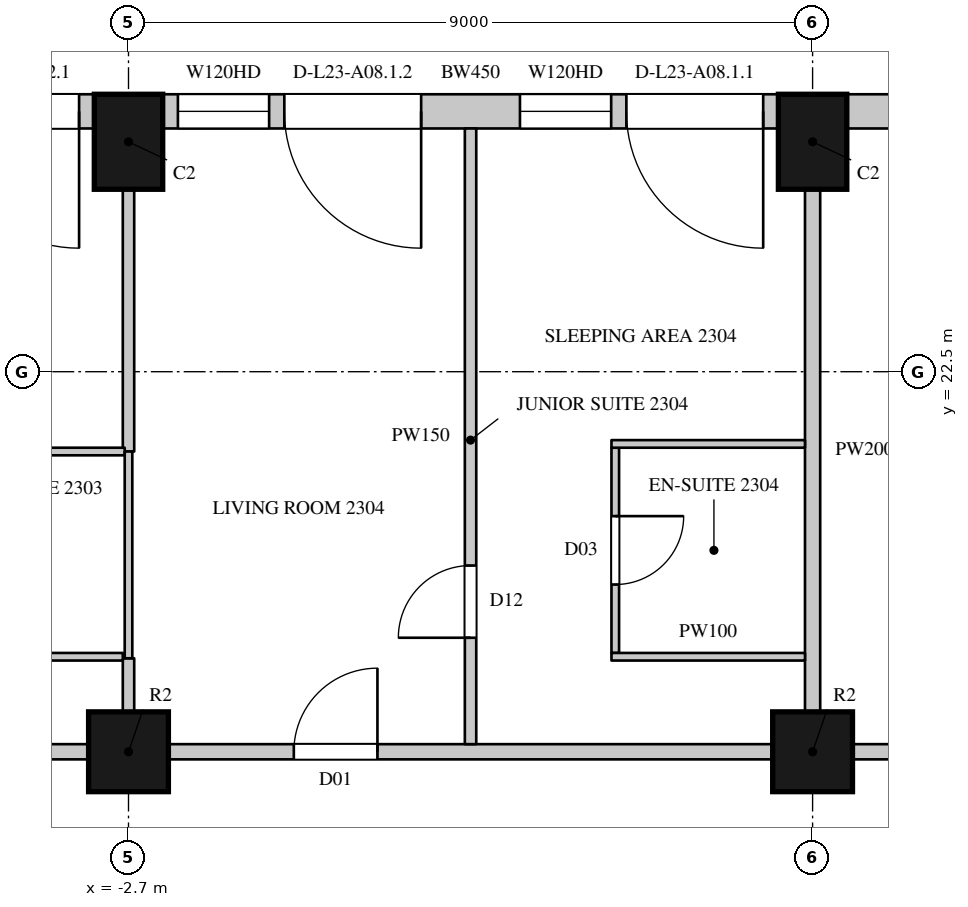
"""IFC4 building model, lengths in metres.
Left out: names, types, materials, properties, quantities, classifications, styles, units other than length and angle.
Written with IfcOpenShell. Run it as: python <this file> out.ifc"""

import sys

from ifc_helpers import new_model, si_unit, direction, frame, frame_2d, origin, origin_2d, place, context, subcontext, project, spatial, rectangle, circle, extrude, element, fill, save


model = new_model("IFC4")
c1 = context("Model", 3, precision=1e-05, world=origin(), true_north=direction((0.0, 1.0)))
c2 = subcontext(c1, "Body", "Model", "MODEL_VIEW")
j1 = project(units=[si_unit("LENGTHUNIT", "METRE"), si_unit("PLANEANGLEUNIT", "RADIAN")], contexts=[c1])
p1 = place(None, origin())
s1 = spatial("IfcSite", under=j1, at=p1, CompositionType="ELEMENT")
p2 = place(p1, origin())
s2 = spatial("IfcBuilding", under=s1, at=p2, CompositionType="ELEMENT")
p3 = place(p2, frame((0.0, 0.0, 113.1)))
s3 = spatial("IfcBuildingStorey", under=s2, at=p3, CompositionType="ELEMENT", Elevation=113.1)
for number, where, z_axis, x_axis in (
    (1, (6.3, 25.525, 0.0), (0.0, 0.0, 1.0), (-1.0, 0.0, 0.0)),
    (2, (-2.7, 25.525, 0.0), (0.0, 0.0, 1.0), (-1.0, 0.0, 0.0)),
):
    element("IfcColumn", number, at=place(p3, frame(where, z_axis=z_axis, x_axis=x_axis)), inside=s3, PredefinedType="COLUMN", context=c2, shape_type="SweptSolid", body=[
        extrude(rectangle(XDim=0.9, YDim=1.25, at=origin_2d()), origin(), (0.0, 0.0, 1.0), 3.6),
    ])
for number, where, z_axis, x_axis in (
    (3, (-2.7, 17.5, 0.0), (0.0, 0.0, 1.0), (1.0, 0.0, 0.0)),
    (4, (6.3, 17.5, 0.0), (0.0, 0.0, 1.0), (1.0, 0.0, 0.0)),
):
    element("IfcColumn", number, at=place(p3, frame(where, z_axis=z_axis, x_axis=x_axis)), inside=s3, PredefinedType="COLUMN", context=c2, shape_type="SweptSolid", body=[
        extrude(circle(Radius=0.525, at=origin_2d()), origin(), (0.0, 0.0, 1.0), 3.6),
    ])
p4 = place(p3, frame((11.989, 25.925, 0.0), z_axis=(0.0, 0.0, 1.0), x_axis=(-1.0, 0.0, 0.0)))
e5 = element("IfcWall", 5, at=p4, inside=s3, PredefinedType="SOLIDWALL", context=c2, shape_type="SweptSolid", body=[
    extrude(rectangle(XDim=5.239, YDim=0.45, at=frame_2d((2.619, 0.0))), origin(), (0.0, 0.0, 1.0), 3.3),
])
p5 = place(p4, frame((1.77, 0.0, 1.05)))
e6 = element("IfcOpeningElement", 6, at=p5, cuts=e5, PredefinedType="OPENING", context=c2, shape_type="SweptSolid", body=[
    extrude(rectangle(XDim=2.1, YDim=2.0, at=frame_2d((1.05, 1.0))), frame((0.0, 0.235, 0.0), z_axis=(0.0, -1.0, 0.0), x_axis=(1.0, 0.0, 0.0)), (0.0, 0.0, 1.0), 0.47),
])
p6 = place(p3, frame((5.85, 25.925, 0.0), z_axis=(0.0, 0.0, 1.0), x_axis=(-1.0, 0.0, 0.0)))
e7 = element("IfcWall", 7, at=p6, inside=s3, PredefinedType="SOLIDWALL", context=c2, shape_type="SweptSolid", body=[
    extrude(rectangle(XDim=8.1, YDim=0.45, at=frame_2d((4.05, 0.0))), origin(), (0.0, 0.0, 1.0), 3.3),
])
p7 = place(p6, frame((0.2, 0.0, 0.0)))
e8 = element("IfcOpeningElement", 8, at=p7, cuts=e7, PredefinedType="OPENING", context=c2, shape_type="SweptSolid", body=[
    extrude(rectangle(XDim=1.8, YDim=2.4, at=frame_2d((0.9, 1.2))), frame((0.0, 0.235, 0.0), z_axis=(0.0, -1.0, 0.0), x_axis=(1.0, 0.0, 0.0)), (0.0, 0.0, 1.0), 0.47),
])
p8 = place(p6, frame((2.2, 0.0, 1.05)))
e9 = element("IfcOpeningElement", 9, at=p8, cuts=e7, PredefinedType="OPENING", context=c2, shape_type="SweptSolid", body=[
    extrude(rectangle(XDim=1.2, YDim=2.0, at=frame_2d((0.6, 1.0))), frame((0.0, 0.235, 0.0), z_axis=(0.0, -1.0, 0.0), x_axis=(1.0, 0.0, 0.0)), (0.0, 0.0, 1.0), 0.47),
])
p9 = place(p6, frame((4.7, 0.0, 0.0)))
e10 = element("IfcOpeningElement", 10, at=p9, cuts=e7, PredefinedType="OPENING", context=c2, shape_type="SweptSolid", body=[
    extrude(rectangle(XDim=1.8, YDim=2.4, at=frame_2d((0.9, 1.2))), frame((0.0, 0.235, 0.0), z_axis=(0.0, -1.0, 0.0), x_axis=(1.0, 0.0, 0.0)), (0.0, 0.0, 1.0), 0.47),
])
p10 = place(p6, frame((6.7, 0.0, 1.05)))
e11 = element("IfcOpeningElement", 11, at=p10, cuts=e7, PredefinedType="OPENING", context=c2, shape_type="SweptSolid", body=[
    extrude(rectangle(XDim=1.2, YDim=2.0, at=frame_2d((0.6, 1.0))), frame((0.0, 0.235, 0.0), z_axis=(0.0, -1.0, 0.0), x_axis=(1.0, 0.0, 0.0)), (0.0, 0.0, 1.0), 0.47),
])
p11 = place(p3, frame((-3.15, 25.925, 0.0), z_axis=(0.0, 0.0, 1.0), x_axis=(-1.0, 0.0, 0.0)))
e12 = element("IfcWall", 12, at=p11, inside=s3, PredefinedType="SOLIDWALL", context=c2, shape_type="SweptSolid", body=[
    extrude(rectangle(XDim=8.1, YDim=0.45, at=frame_2d((4.05, 0.0))), origin(), (0.0, 0.0, 1.0), 3.3),
])
p12 = place(p11, frame((0.2, 0.0, 0.0)))
e13 = element("IfcOpeningElement", 13, at=p12, cuts=e12, PredefinedType="OPENING", context=c2, shape_type="SweptSolid", body=[
    extrude(rectangle(XDim=1.8, YDim=2.4, at=frame_2d((0.9, 1.2))), frame((0.0, 0.235, 0.0), z_axis=(0.0, -1.0, 0.0), x_axis=(1.0, 0.0, 0.0)), (0.0, 0.0, 1.0), 0.47),
])
p13 = place(p11, frame((2.2, 0.0, 1.05)))
e14 = element("IfcOpeningElement", 14, at=p13, cuts=e12, PredefinedType="OPENING", context=c2, shape_type="SweptSolid", body=[
    extrude(rectangle(XDim=1.2, YDim=2.0, at=frame_2d((0.6, 1.0))), frame((0.0, 0.235, 0.0), z_axis=(0.0, -1.0, 0.0), x_axis=(1.0, 0.0, 0.0)), (0.0, 0.0, 1.0), 0.47),
])
p14 = place(p11, frame((4.7, 0.0, 0.0)))
e15 = element("IfcOpeningElement", 15, at=p14, cuts=e12, PredefinedType="OPENING", context=c2, shape_type="SweptSolid", body=[
    extrude(rectangle(XDim=1.8, YDim=2.4, at=frame_2d((0.9, 1.2))), frame((0.0, 0.235, 0.0), z_axis=(0.0, -1.0, 0.0), x_axis=(1.0, 0.0, 0.0)), (0.0, 0.0, 1.0), 0.47),
])
p15 = place(p11, frame((6.7, 0.0, 1.05)))
e16 = element("IfcOpeningElement", 16, at=p15, cuts=e12, PredefinedType="OPENING", context=c2, shape_type="SweptSolid", body=[
    extrude(rectangle(XDim=1.2, YDim=2.0, at=frame_2d((0.6, 1.0))), frame((0.0, 0.235, 0.0), z_axis=(0.0, -1.0, 0.0), x_axis=(1.0, 0.0, 0.0)), (0.0, 0.0, 1.0), 0.47),
])
p16 = place(p3, frame((-11.175, 17.5, 0.0), z_axis=(0.0, 0.0, 1.0), x_axis=(1.0, 0.0, 0.0)))
e17 = element("IfcWall", 17, at=p16, inside=s3, PredefinedType="PARTITIONING", context=c2, shape_type="SweptSolid", body=[
    extrude(rectangle(XDim=7.95, YDim=0.2, at=frame_2d((3.975, 0.0))), origin(), (0.0, 0.0, 1.0), 2.75),
])
p17 = place(p16, frame((4.55, 0.0, 0.0)))
e18 = element("IfcOpeningElement", 18, at=p17, cuts=e17, PredefinedType="OPENING", context=c2, shape_type="SweptSolid", body=[
    extrude(rectangle(XDim=0.95, YDim=2.2, at=frame_2d((0.475, 1.1))), frame((0.0, 0.11, 0.0), z_axis=(0.0, -1.0, 0.0), x_axis=(1.0, 0.0, 0.0)), (0.0, 0.0, 1.0), 0.22),
])
p18 = place(p3, frame((-2.175, 17.5, 0.0), z_axis=(0.0, 0.0, 1.0), x_axis=(1.0, 0.0, 0.0)))
e19 = element("IfcWall", 19, at=p18, inside=s3, PredefinedType="PARTITIONING", context=c2, shape_type="SweptSolid", body=[
    extrude(rectangle(XDim=7.95, YDim=0.2, at=frame_2d((3.975, 0.0))), origin(), (0.0, 0.0, 1.0), 2.75),
])
p19 = place(p18, frame((1.65, 0.0, 0.0)))
e20 = element("IfcOpeningElement", 20, at=p19, cuts=e19, PredefinedType="OPENING", context=c2, shape_type="SweptSolid", body=[
    extrude(rectangle(XDim=1.1, YDim=2.4, at=frame_2d((0.55, 1.2))), frame((0.0, 0.11, 0.0), z_axis=(0.0, -1.0, 0.0), x_axis=(1.0, 0.0, 0.0)), (0.0, 0.0, 1.0), 0.22),
])
p20 = place(p3, frame((6.825, 17.5, 0.0), z_axis=(0.0, 0.0, 1.0), x_axis=(1.0, 0.0, 0.0)))
e21 = element("IfcWall", 21, at=p20, inside=s3, PredefinedType="PARTITIONING", context=c2, shape_type="SweptSolid", body=[
    extrude(rectangle(XDim=7.95, YDim=0.2, at=frame_2d((3.975, 0.0))), origin(), (0.0, 0.0, 1.0), 2.75),
])
p21 = place(p20, frame((1.55, 0.0, 0.0)))
e22 = element("IfcOpeningElement", 22, at=p21, cuts=e21, PredefinedType="OPENING", context=c2, shape_type="SweptSolid", body=[
    extrude(rectangle(XDim=1.1, YDim=2.4, at=frame_2d((0.55, 1.2))), frame((0.0, 0.11, 0.0), z_axis=(0.0, -1.0, 0.0), x_axis=(1.0, 0.0, 0.0)), (0.0, 0.0, 1.0), 0.22),
])
p22 = place(p3, frame((-2.7, 18.025, 0.0), z_axis=(0.0, 0.0, 1.0), x_axis=(0.0, 1.0, 0.0)))
e23 = element("IfcWall", 23, at=p22, inside=s3, PredefinedType="PARTITIONING", context=c2, shape_type="SweptSolid", body=[
    extrude(rectangle(XDim=0.705, YDim=0.15, at=frame_2d((0.353, 0.0))), origin(), (0.0, 0.0, 1.0), 2.75),
])
p23 = place(p3, frame((-2.7, 21.45, 0.0), z_axis=(0.0, 0.0, 1.0), x_axis=(0.0, 1.0, 0.0)))
e24 = element("IfcWall", 24, at=p23, inside=s3, PredefinedType="PARTITIONING", context=c2, shape_type="SweptSolid", body=[
    extrude(rectangle(XDim=3.45, YDim=0.15, at=frame_2d((1.725, 0.0))), origin(), (0.0, 0.0, 1.0), 2.75),
])
p24 = place(p3, frame((1.8, 17.6, 0.0), z_axis=(0.0, 0.0, 1.0), x_axis=(0.0, 1.0, 0.0)))
e25 = element("IfcWall", 25, at=p24, inside=s3, PredefinedType="PARTITIONING", context=c2, shape_type="SweptSolid", body=[
    extrude(rectangle(XDim=8.1, YDim=0.15, at=frame_2d((4.05, 0.0))), origin(), (0.0, 0.0, 1.0), 2.65),
])
p25 = place(p24, frame((1.4, 0.0, 0.0)))
e26 = element("IfcOpeningElement", 26, at=p25, cuts=e25, PredefinedType="OPENING", context=c2, shape_type="SweptSolid", body=[
    extrude(rectangle(XDim=0.95, YDim=2.2, at=frame_2d((0.475, 1.1))), frame((0.0, 0.085, 0.0), z_axis=(0.0, -1.0, 0.0), x_axis=(1.0, 0.0, 0.0)), (0.0, 0.0, 1.0), 0.17),
])
p26 = place(p3, frame((6.3, 18.025, 0.0), z_axis=(0.0, 0.0, 1.0), x_axis=(0.0, 1.0, 0.0)))
e27 = element("IfcWall", 27, at=p26, inside=s3, PredefinedType="PARTITIONING", context=c2, shape_type="SweptSolid", body=[
    extrude(rectangle(XDim=6.875, YDim=0.2, at=frame_2d((3.438, 0.0))), origin(), (0.0, 0.0, 1.0), 2.75),
])
p27 = place(p3, frame((-5.146, 18.75, 0.0), z_axis=(0.0, 0.0, 1.0), x_axis=(1.0, 0.0, 0.0)))
e28 = element("IfcWall", 28, at=p27, inside=s3, PredefinedType="PARTITIONING", context=c2, shape_type="SweptSolid", body=[
    extrude(rectangle(XDim=2.371, YDim=0.1, at=frame_2d((1.186, 0.0))), origin(), (0.0, 0.0, 1.0), 3.3),
])
p28 = place(p3, frame((-5.146, 21.45, 0.0), z_axis=(0.0, 0.0, 1.0), x_axis=(1.0, 0.0, 0.0)))
e29 = element("IfcWall", 29, at=p28, inside=s3, PredefinedType="PARTITIONING", context=c2, shape_type="SweptSolid", body=[
    extrude(rectangle(XDim=2.396, YDim=0.1, at=frame_2d((1.198, 0.0))), origin(), (0.0, 0.0, 1.0), 3.3),
])
p29 = place(p3, frame((-2.7, 18.73, 0.0), z_axis=(0.0, 0.0, 1.0), x_axis=(0.0, 1.0, 0.0)))
e30 = element("IfcWall", 30, at=p29, inside=s3, PredefinedType="PARTITIONING", context=c2, shape_type="SweptSolid", body=[
    extrude(rectangle(XDim=2.72, YDim=0.1, at=frame_2d((1.36, 0.0))), origin(), (0.0, 0.0, 1.0), 2.75),
])
p30 = place(p3, frame((3.704, 18.8, 0.0), z_axis=(0.0, 0.0, 1.0), x_axis=(0.0, 1.0, 0.0)))
e31 = element("IfcWall", 31, at=p30, inside=s3, PredefinedType="PARTITIONING", context=c2, shape_type="SweptSolid", body=[
    extrude(rectangle(XDim=2.7, YDim=0.1, at=frame_2d((1.35, 0.0))), origin(), (0.0, 0.0, 1.0), 3.3),
])
p31 = place(p30, frame((0.9, 0.0, 0.0)))
e32 = element("IfcOpeningElement", 32, at=p31, cuts=e31, PredefinedType="OPENING", context=c2, shape_type="SweptSolid", body=[
    extrude(rectangle(XDim=0.9, YDim=2.2, at=frame_2d((0.45, 1.1))), frame((0.0, 0.06, 0.0), z_axis=(0.0, -1.0, 0.0), x_axis=(1.0, 0.0, 0.0)), (0.0, 0.0, 1.0), 0.12),
])
for number, where, z_axis, x_axis in (
    (33, (3.654, 18.75, 0.0), (0.0, 0.0, 1.0), (1.0, 0.0, 0.0)),
    (34, (3.654, 21.55, 0.0), (0.0, 0.0, 1.0), (1.0, 0.0, 0.0)),
):
    element("IfcWall", number, at=place(p3, frame(where, z_axis=z_axis, x_axis=x_axis)), inside=s3, PredefinedType="PARTITIONING", context=c2, shape_type="SweptSolid", body=[
        extrude(rectangle(XDim=2.546, YDim=0.1, at=frame_2d((1.273, 0.0))), origin(), (0.0, 0.0, 1.0), 3.3),
    ])
p32 = place(p7, origin())
e35 = element("IfcDoor", 35, at=p32, inside=s3, OperationType="SLIDING_TO_LEFT", PredefinedType="DOOR", context=c2, shape_type="SweptSolid", body=[
    extrude(rectangle(XDim=1.8, YDim=2.4, at=frame_2d((0.9, 1.2))), frame((0.0, 0.13, 0.0), z_axis=(0.0, -1.0, 0.0), x_axis=(1.0, 0.0, 0.0)), (0.0, 0.0, 1.0), 0.05),
])
fill(e8, e35)
p33 = place(p8, origin())
e36 = element("IfcWindow", 36, at=p33, inside=s3, PartitioningType="SINGLE_PANEL", PredefinedType="WINDOW", context=c2, shape_type="SweptSolid", body=[
    extrude(rectangle(XDim=1.2, YDim=2.0, at=frame_2d((0.6, 1.0))), frame((0.0, 0.135, 0.0), z_axis=(0.0, -1.0, 0.0), x_axis=(1.0, 0.0, 0.0)), (0.0, 0.0, 1.0), 0.06),
])
fill(e9, e36)
p34 = place(p9, origin())
e37 = element("IfcDoor", 37, at=p34, inside=s3, OperationType="SLIDING_TO_LEFT", PredefinedType="DOOR", context=c2, shape_type="SweptSolid", body=[
    extrude(rectangle(XDim=1.8, YDim=2.4, at=frame_2d((0.9, 1.2))), frame((0.0, 0.13, 0.0), z_axis=(0.0, -1.0, 0.0), x_axis=(1.0, 0.0, 0.0)), (0.0, 0.0, 1.0), 0.05),
])
fill(e10, e37)
p35 = place(p10, origin())
e38 = element("IfcWindow", 38, at=p35, inside=s3, PartitioningType="SINGLE_PANEL", PredefinedType="WINDOW", context=c2, shape_type="SweptSolid", body=[
    extrude(rectangle(XDim=1.2, YDim=2.0, at=frame_2d((0.6, 1.0))), frame((0.0, 0.135, 0.0), z_axis=(0.0, -1.0, 0.0), x_axis=(1.0, 0.0, 0.0)), (0.0, 0.0, 1.0), 0.06),
])
fill(e11, e38)
p36 = place(p12, origin())
e39 = element("IfcDoor", 39, at=p36, inside=s3, OperationType="SLIDING_TO_LEFT", PredefinedType="DOOR", context=c2, shape_type="SweptSolid", body=[
    extrude(rectangle(XDim=1.8, YDim=2.4, at=frame_2d((0.9, 1.2))), frame((0.0, 0.13, 0.0), z_axis=(0.0, -1.0, 0.0), x_axis=(1.0, 0.0, 0.0)), (0.0, 0.0, 1.0), 0.05),
])
fill(e13, e39)
p37 = place(p19, origin())
e40 = element("IfcDoor", 40, at=p37, inside=s3, OperationType="SINGLE_SWING_RIGHT", PredefinedType="DOOR", context=c2, shape_type="SweptSolid", body=[
    extrude(rectangle(XDim=1.1, YDim=2.4, at=frame_2d((0.55, 1.2))), frame((0.0, 0.025, 0.0), z_axis=(0.0, -1.0, 0.0), x_axis=(1.0, 0.0, 0.0)), (0.0, 0.0, 1.0), 0.05),
])
fill(e20, e40)
p38 = place(p25, origin())
e41 = element("IfcDoor", 41, at=p38, inside=s3, OperationType="SINGLE_SWING_LEFT", PredefinedType="DOOR", context=c2, shape_type="SweptSolid", body=[
    extrude(rectangle(XDim=0.95, YDim=2.2, at=frame_2d((0.475, 1.1))), frame((0.0, 0.025, 0.0), z_axis=(0.0, -1.0, 0.0), x_axis=(1.0, 0.0, 0.0)), (0.0, 0.0, 1.0), 0.05),
])
fill(e26, e41)
p39 = place(p31, origin())
e42 = element("IfcDoor", 42, at=p39, inside=s3, OperationType="SINGLE_SWING_LEFT", PredefinedType="DOOR", context=c2, shape_type="SweptSolid", body=[
    extrude(rectangle(XDim=0.9, YDim=2.2, at=frame_2d((0.45, 1.1))), frame((0.0, 0.025, 0.0), z_axis=(0.0, -1.0, 0.0), x_axis=(1.0, 0.0, 0.0)), (0.0, 0.0, 1.0), 0.05),
])
fill(e32, e42)
save(model, sys.argv[1])
